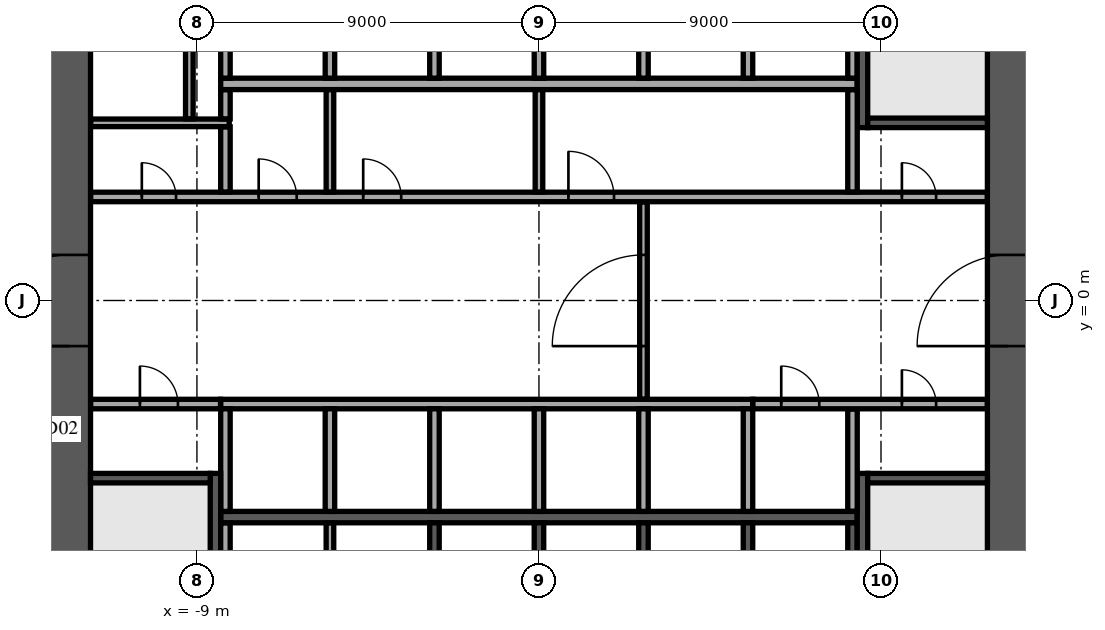
"""IFC4 building model, lengths in metres.
Left out: names, types, materials, properties, quantities, classifications, styles, units other than length and angle.
Written with IfcOpenShell. Run it as: python <this file> out.ifc"""

import sys

from ifc_helpers import new_model, si_unit, direction, frame, frame_2d, origin, place, context, subcontext, project, spatial, rectangle, extrude, element, fill, save


model = new_model("IFC4")
c1 = context("Model", 3, precision=1e-05, world=origin(), true_north=direction((0.0, 1.0)))
c2 = subcontext(c1, "Body", "Model", "MODEL_VIEW")
j1 = project(units=[si_unit("LENGTHUNIT", "METRE"), si_unit("PLANEANGLEUNIT", "RADIAN")], contexts=[c1])
p1 = place(None, origin())
s1 = spatial("IfcSite", under=j1, at=p1, CompositionType="ELEMENT")
p2 = place(p1, origin())
s2 = spatial("IfcBuilding", under=s1, at=p2, CompositionType="ELEMENT")
p3 = place(p2, frame((0.0, 0.0, 102.1)))
s3 = spatial("IfcBuildingStorey", under=s2, at=p3, CompositionType="ELEMENT", Elevation=102.1)
p4 = place(p3, frame((12.35, -11.8, 0.0), z_axis=(0.0, 0.0, 1.0), x_axis=(0.0, 1.0, 0.0)))
e1 = element("IfcWall", 1, at=p4, inside=s3, PredefinedType="SHEAR", context=c2, shape_type="SweptSolid", body=[
    extrude(rectangle(XDim=23.6, YDim=1.1, at=frame_2d((11.8, 0.0))), origin(), (0.0, 0.0, 1.0), 3.58),
])
p5 = place(p4, frame((10.6, 0.0, 0.0)))
e2 = element("IfcOpeningElement", 2, at=p5, cuts=e1, PredefinedType="OPENING", context=c2, shape_type="SweptSolid", body=[
    extrude(rectangle(XDim=2.4, YDim=2.4, at=frame_2d((1.2, 1.2))), frame((0.0, 0.56, 0.0), z_axis=(0.0, -1.0, 0.0), x_axis=(1.0, 0.0, 0.0)), (0.0, 0.0, 1.0), 1.12),
])
p6 = place(p3, frame((-12.35, -11.8, 0.0), z_axis=(0.0, 0.0, 1.0), x_axis=(0.0, 1.0, 0.0)))
e3 = element("IfcWall", 3, at=p6, inside=s3, PredefinedType="SHEAR", context=c2, shape_type="SweptSolid", body=[
    extrude(rectangle(XDim=23.6, YDim=1.1, at=frame_2d((11.8, 0.0))), origin(), (0.0, 0.0, 1.0), 3.58),
])
p7 = place(p6, frame((10.6, 0.0, 0.0)))
e4 = element("IfcOpeningElement", 4, at=p7, cuts=e3, PredefinedType="OPENING", context=c2, shape_type="SweptSolid", body=[
    extrude(rectangle(XDim=2.4, YDim=2.4, at=frame_2d((1.2, 1.2))), frame((0.0, 0.56, 0.0), z_axis=(0.0, -1.0, 0.0), x_axis=(1.0, 0.0, 0.0)), (0.0, 0.0, 1.0), 1.12),
])
for number, where, z_axis, x_axis in (
    (5, (-8.375, 5.7, 0.0), (0.0, 0.0, 1.0), (1.0, 0.0, 0.0)),
    (6, (-8.375, -5.7, 0.0), (0.0, 0.0, 1.0), (1.0, 0.0, 0.0)),
):
    element("IfcWall", number, at=place(p3, frame(where, z_axis=z_axis, x_axis=x_axis)), inside=s3, PredefinedType="SOLIDWALL", context=c2, shape_type="SweptSolid", body=[
        extrude(rectangle(XDim=16.75, YDim=0.3, at=frame_2d((8.375, 0.0))), origin(), (0.0, 0.0, 1.0), 3.58),
    ])
for number, where, z_axis, x_axis in (
    (7, (-8.25, 5.85, 0.0), (0.0, 0.0, 1.0), (0.0, 1.0, 0.0)),
    (8, (-5.5, 5.85, 0.0), (0.0, 0.0, 1.0), (0.0, 1.0, 0.0)),
    (9, (-2.75, 5.85, 0.0), (0.0, 0.0, 1.0), (0.0, 1.0, 0.0)),
    (10, (0.0, 5.85, 0.0), (0.0, 0.0, 1.0), (0.0, 1.0, 0.0)),
    (11, (2.75, 5.85, 0.0), (0.0, 0.0, 1.0), (0.0, 1.0, 0.0)),
    (12, (5.5, 5.85, 0.0), (0.0, 0.0, 1.0), (0.0, 1.0, 0.0)),
    (13, (8.25, 5.85, 0.0), (0.0, 0.0, 1.0), (0.0, 1.0, 0.0)),
):
    element("IfcWall", number, at=place(p3, frame(where, z_axis=z_axis, x_axis=x_axis)), inside=s3, PredefinedType="SOLIDWALL", context=c2, shape_type="SweptSolid", body=[
        extrude(rectangle(XDim=2.7, YDim=0.25, at=frame_2d((1.35, 0.0))), origin(), (0.0, 0.0, 1.0), 3.58),
    ])
p8 = place(p3, frame((-8.375, -2.725, 0.0), z_axis=(0.0, 0.0, 1.0), x_axis=(1.0, 0.0, 0.0)))
e14 = element("IfcWall", 14, at=p8, inside=s3, PredefinedType="SOLIDWALL", context=c2, shape_type="SweptSolid", body=[
    extrude(rectangle(XDim=14.0, YDim=0.25, at=frame_2d((7.0, 0.0))), origin(), (0.0, 0.0, 1.0), 3.58),
])
for number, where, z_axis, x_axis in (
    (15, (-8.25, -5.55, 0.0), (0.0, 0.0, 1.0), (0.0, 1.0, 0.0)),
    (16, (-5.5, -5.55, 0.0), (0.0, 0.0, 1.0), (0.0, 1.0, 0.0)),
    (17, (-2.75, -5.55, 0.0), (0.0, 0.0, 1.0), (0.0, 1.0, 0.0)),
    (18, (0.0, -5.55, 0.0), (0.0, 0.0, 1.0), (0.0, 1.0, 0.0)),
    (19, (2.75, -5.55, 0.0), (0.0, 0.0, 1.0), (0.0, 1.0, 0.0)),
    (20, (5.5, -5.55, 0.0), (0.0, 0.0, 1.0), (0.0, 1.0, 0.0)),
    (21, (-2.75, -8.55, 0.0), (0.0, 0.0, 1.0), (0.0, 1.0, 0.0)),
    (22, (0.0, -8.55, 0.0), (0.0, 0.0, 1.0), (0.0, 1.0, 0.0)),
    (23, (2.75, -8.55, 0.0), (0.0, 0.0, 1.0), (0.0, 1.0, 0.0)),
    (24, (5.5, -8.55, 0.0), (0.0, 0.0, 1.0), (0.0, 1.0, 0.0)),
    (25, (8.25, -8.55, 0.0), (0.0, 0.0, 1.0), (0.0, 1.0, 0.0)),
):
    element("IfcWall", number, at=place(p3, frame(where, z_axis=z_axis, x_axis=x_axis)), inside=s3, PredefinedType="SOLIDWALL", context=c2, shape_type="SweptSolid", body=[
        extrude(rectangle(XDim=2.7, YDim=0.25, at=frame_2d((1.35, 0.0))), origin(), (0.0, 0.0, 1.0), 3.58),
    ])
p9 = place(p3, frame((8.512, 4.55, 0.0), z_axis=(0.0, 0.0, 1.0), x_axis=(0.0, 1.0, 0.0)))
e26 = element("IfcWall", 26, at=p9, inside=s3, PredefinedType="SOLIDWALL", context=c2, shape_type="SweptSolid", body=[
    extrude(rectangle(XDim=7.25, YDim=0.275, at=frame_2d((3.625, 0.0))), origin(), (0.0, 0.0, 1.0), 3.58),
])
p10 = place(p9, frame((6.0, 0.0, 0.0)))
e27 = element("IfcOpeningElement", 27, at=p10, cuts=e26, PredefinedType="OPENING", context=c2, shape_type="SweptSolid", body=[
    extrude(rectangle(XDim=1.0, YDim=2.1, at=frame_2d((0.5, 1.05))), frame((0.0, 0.147, 0.0), z_axis=(0.0, -1.0, 0.0), x_axis=(1.0, 0.0, 0.0)), (0.0, 0.0, 1.0), 0.295),
])
p11 = place(p3, frame((8.65, 4.675, 0.0), z_axis=(0.0, 0.0, 1.0), x_axis=(1.0, 0.0, 0.0)))
e28 = element("IfcWall", 28, at=p11, inside=s3, PredefinedType="SOLIDWALL", context=c2, shape_type="SweptSolid", body=[
    extrude(rectangle(XDim=3.15, YDim=0.25, at=frame_2d((1.575, 0.0))), origin(), (0.0, 0.0, 1.0), 3.58),
])
p12 = place(p3, frame((-8.512, -4.55, 0.0), z_axis=(0.0, 0.0, 1.0), x_axis=(0.0, -1.0, 0.0)))
e29 = element("IfcWall", 29, at=p12, inside=s3, PredefinedType="SOLIDWALL", context=c2, shape_type="SweptSolid", body=[
    extrude(rectangle(XDim=7.25, YDim=0.275, at=frame_2d((3.625, 0.0))), origin(), (0.0, 0.0, 1.0), 3.58),
])
p13 = place(p12, frame((6.0, 0.0, 0.0)))
e30 = element("IfcOpeningElement", 30, at=p13, cuts=e29, PredefinedType="OPENING", context=c2, shape_type="SweptSolid", body=[
    extrude(rectangle(XDim=1.0, YDim=2.1, at=frame_2d((0.5, 1.05))), frame((0.0, 0.147, 0.0), z_axis=(0.0, -1.0, 0.0), x_axis=(1.0, 0.0, 0.0)), (0.0, 0.0, 1.0), 0.295),
])
p14 = place(p3, frame((-8.65, -4.675, 0.0), z_axis=(0.0, 0.0, 1.0), x_axis=(-1.0, 0.0, 0.0)))
e31 = element("IfcWall", 31, at=p14, inside=s3, PredefinedType="SOLIDWALL", context=c2, shape_type="SweptSolid", body=[
    extrude(rectangle(XDim=3.15, YDim=0.25, at=frame_2d((1.575, 0.0))), origin(), (0.0, 0.0, 1.0), 3.58),
])
p15 = place(p3, frame((8.512, -4.55, 0.0), z_axis=(0.0, 0.0, 1.0), x_axis=(0.0, -1.0, 0.0)))
e32 = element("IfcWall", 32, at=p15, inside=s3, PredefinedType="SOLIDWALL", context=c2, shape_type="SweptSolid", body=[
    extrude(rectangle(XDim=7.25, YDim=0.275, at=frame_2d((3.625, 0.0))), origin(), (0.0, 0.0, 1.0), 3.58),
])
p16 = place(p15, frame((6.0, 0.0, 0.0)))
e33 = element("IfcOpeningElement", 33, at=p16, cuts=e32, PredefinedType="OPENING", context=c2, shape_type="SweptSolid", body=[
    extrude(rectangle(XDim=1.0, YDim=2.1, at=frame_2d((0.5, 1.05))), frame((0.0, 0.147, 0.0), z_axis=(0.0, -1.0, 0.0), x_axis=(1.0, 0.0, 0.0)), (0.0, 0.0, 1.0), 0.295),
])
p17 = place(p3, frame((8.65, -4.675, 0.0), z_axis=(0.0, 0.0, 1.0), x_axis=(1.0, 0.0, 0.0)))
e34 = element("IfcWall", 34, at=p17, inside=s3, PredefinedType="SOLIDWALL", context=c2, shape_type="SweptSolid", body=[
    extrude(rectangle(XDim=3.15, YDim=0.25, at=frame_2d((1.575, 0.0))), origin(), (0.0, 0.0, 1.0), 3.58),
])
p18 = place(p3, frame((-8.25, -8.545, 0.0), z_axis=(0.0, 0.0, 1.0), x_axis=(0.0, 1.0, 0.0)))
e35 = element("IfcWall", 35, at=p18, inside=s3, PredefinedType="PARTITIONING", context=c2, shape_type="SweptSolid", body=[
    extrude(rectangle(XDim=2.69, YDim=0.25, at=frame_2d((1.345, 0.0))), origin(), (0.0, 0.0, 1.0), 3.58),
])
p19 = place(p3, frame((-5.5, -8.545, 0.0), z_axis=(0.0, 0.0, 1.0), x_axis=(0.0, 1.0, 0.0)))
e36 = element("IfcWall", 36, at=p19, inside=s3, PredefinedType="PARTITIONING", context=c2, shape_type="SweptSolid", body=[
    extrude(rectangle(XDim=2.69, YDim=0.2, at=frame_2d((1.345, 0.0))), origin(), (0.0, 0.0, 1.0), 3.58),
])
p20 = place(p3, frame((8.25, -5.545, 0.0), z_axis=(0.0, 0.0, 1.0), x_axis=(0.0, 1.0, 0.0)))
e37 = element("IfcWall", 37, at=p20, inside=s3, PredefinedType="PARTITIONING", context=c2, shape_type="SweptSolid", body=[
    extrude(rectangle(XDim=2.69, YDim=0.25, at=frame_2d((1.345, 0.0))), origin(), (0.0, 0.0, 1.0), 3.58),
])
p21 = place(p3, frame((-11.795, -2.725, 0.0), z_axis=(0.0, 0.0, 1.0), x_axis=(1.0, 0.0, 0.0)))
e38 = element("IfcWall", 38, at=p21, inside=s3, PredefinedType="PARTITIONING", context=c2, shape_type="SweptSolid", body=[
    extrude(rectangle(XDim=3.415, YDim=0.25, at=frame_2d((1.708, 0.0))), origin(), (0.0, 0.0, 1.0), 3.58),
])
p22 = place(p21, frame((1.295, 0.0, 0.0)))
e39 = element("IfcOpeningElement", 39, at=p22, cuts=e38, PredefinedType="OPENING", context=c2, shape_type="SweptSolid", body=[
    extrude(rectangle(XDim=1.0, YDim=2.1, at=frame_2d((0.5, 1.05))), frame((0.0, 0.135, 0.0), z_axis=(0.0, -1.0, 0.0), x_axis=(1.0, 0.0, 0.0)), (0.0, 0.0, 1.0), 0.27),
])
p23 = place(p3, frame((5.63, -2.725, 0.0), z_axis=(0.0, 0.0, 1.0), x_axis=(1.0, 0.0, 0.0)))
e40 = element("IfcWall", 40, at=p23, inside=s3, PredefinedType="PARTITIONING", context=c2, shape_type="SweptSolid", body=[
    extrude(rectangle(XDim=6.165, YDim=0.25, at=frame_2d((3.083, 0.0))), origin(), (0.0, 0.0, 1.0), 3.58),
])
p24 = place(p23, frame((0.745, 0.0, 0.0)))
e41 = element("IfcOpeningElement", 41, at=p24, cuts=e40, PredefinedType="OPENING", context=c2, shape_type="SweptSolid", body=[
    extrude(rectangle(XDim=1.0, YDim=2.1, at=frame_2d((0.5, 1.05))), frame((0.0, 0.135, 0.0), z_axis=(0.0, -1.0, 0.0), x_axis=(1.0, 0.0, 0.0)), (0.0, 0.0, 1.0), 0.27),
])
p25 = place(p23, frame((3.92, 0.0, 0.0)))
e42 = element("IfcOpeningElement", 42, at=p25, cuts=e40, PredefinedType="OPENING", context=c2, shape_type="SweptSolid", body=[
    extrude(rectangle(XDim=0.9, YDim=2.1, at=frame_2d((0.45, 1.05))), frame((0.0, 0.135, 0.0), z_axis=(0.0, -1.0, 0.0), x_axis=(1.0, 0.0, 0.0)), (0.0, 0.0, 1.0), 0.27),
])
p26 = place(p3, frame((2.75, -2.595, 0.0), z_axis=(0.0, 0.0, 1.0), x_axis=(0.0, 1.0, 0.0)))
e43 = element("IfcWall", 43, at=p26, inside=s3, PredefinedType="PARTITIONING", context=c2, shape_type="SweptSolid", body=[
    extrude(rectangle(XDim=5.19, YDim=0.2, at=frame_2d((2.595, 0.0))), origin(), (0.0, 0.0, 1.0), 3.58),
])
p27 = place(p26, frame((1.395, 0.0, 0.0)))
e44 = element("IfcOpeningElement", 44, at=p27, cuts=e43, PredefinedType="OPENING", context=c2, shape_type="SweptSolid", body=[
    extrude(rectangle(XDim=2.4, YDim=2.4, at=frame_2d((1.2, 1.2))), frame((0.0, 0.11, 0.0), z_axis=(0.0, -1.0, 0.0), x_axis=(1.0, 0.0, 0.0)), (0.0, 0.0, 1.0), 0.22),
])
p28 = place(p3, frame((-11.795, 2.725, 0.0), z_axis=(0.0, 0.0, 1.0), x_axis=(1.0, 0.0, 0.0)))
e45 = element("IfcWall", 45, at=p28, inside=s3, PredefinedType="PARTITIONING", context=c2, shape_type="SweptSolid", body=[
    extrude(rectangle(XDim=23.59, YDim=0.25, at=frame_2d((11.795, 0.0))), origin(), (0.0, 0.0, 1.0), 3.58),
])
p29 = place(p28, frame((21.345, 0.0, 0.0)))
e46 = element("IfcOpeningElement", 46, at=p29, cuts=e45, PredefinedType="OPENING", context=c2, shape_type="SweptSolid", body=[
    extrude(rectangle(XDim=0.9, YDim=2.1, at=frame_2d((0.45, 1.05))), frame((0.0, 0.135, 0.0), z_axis=(0.0, -1.0, 0.0), x_axis=(1.0, 0.0, 0.0)), (0.0, 0.0, 1.0), 0.27),
])
p30 = place(p28, frame((1.345, 0.0, 0.0)))
e47 = element("IfcOpeningElement", 47, at=p30, cuts=e45, PredefinedType="OPENING", context=c2, shape_type="SweptSolid", body=[
    extrude(rectangle(XDim=0.9, YDim=2.1, at=frame_2d((0.45, 1.05))), frame((0.0, 0.135, 0.0), z_axis=(0.0, -1.0, 0.0), x_axis=(1.0, 0.0, 0.0)), (0.0, 0.0, 1.0), 0.27),
])
p31 = place(p28, frame((4.42, 0.0, 0.0)))
e48 = element("IfcOpeningElement", 48, at=p31, cuts=e45, PredefinedType="OPENING", context=c2, shape_type="SweptSolid", body=[
    extrude(rectangle(XDim=1.0, YDim=2.1, at=frame_2d((0.5, 1.05))), frame((0.0, 0.135, 0.0), z_axis=(0.0, -1.0, 0.0), x_axis=(1.0, 0.0, 0.0)), (0.0, 0.0, 1.0), 0.27),
])
p32 = place(p28, frame((7.17, 0.0, 0.0)))
e49 = element("IfcOpeningElement", 49, at=p32, cuts=e45, PredefinedType="OPENING", context=c2, shape_type="SweptSolid", body=[
    extrude(rectangle(XDim=1.0, YDim=2.1, at=frame_2d((0.5, 1.05))), frame((0.0, 0.135, 0.0), z_axis=(0.0, -1.0, 0.0), x_axis=(1.0, 0.0, 0.0)), (0.0, 0.0, 1.0), 0.27),
])
p33 = place(p28, frame((12.57, 0.0, 0.0)))
e50 = element("IfcOpeningElement", 50, at=p33, cuts=e45, PredefinedType="OPENING", context=c2, shape_type="SweptSolid", body=[
    extrude(rectangle(XDim=1.2, YDim=2.1, at=frame_2d((0.6, 1.05))), frame((0.0, 0.135, 0.0), z_axis=(0.0, -1.0, 0.0), x_axis=(1.0, 0.0, 0.0)), (0.0, 0.0, 1.0), 0.27),
])
p34 = place(p3, frame((-8.25, 2.855, 0.0), z_axis=(0.0, 0.0, 1.0), x_axis=(0.0, 1.0, 0.0)))
e51 = element("IfcWall", 51, at=p34, inside=s3, PredefinedType="PARTITIONING", context=c2, shape_type="SweptSolid", body=[
    extrude(rectangle(XDim=1.715, YDim=0.25, at=frame_2d((0.857, 0.0))), origin(), (0.0, 0.0, 1.0), 3.58),
])
for number, where, z_axis, x_axis in (
    (52, (-5.5, 2.855, 0.0), (0.0, 0.0, 1.0), (0.0, 1.0, 0.0)),
    (53, (0.0, 2.855, 0.0), (0.0, 0.0, 1.0), (0.0, 1.0, 0.0)),
):
    element("IfcWall", number, at=place(p3, frame(where, z_axis=z_axis, x_axis=x_axis)), inside=s3, PredefinedType="PARTITIONING", context=c2, shape_type="SweptSolid", body=[
        extrude(rectangle(XDim=2.69, YDim=0.2, at=frame_2d((1.345, 0.0))), origin(), (0.0, 0.0, 1.0), 3.58),
    ])
p35 = place(p3, frame((8.25, 2.855, 0.0), z_axis=(0.0, 0.0, 1.0), x_axis=(0.0, 1.0, 0.0)))
e54 = element("IfcWall", 54, at=p35, inside=s3, PredefinedType="PARTITIONING", context=c2, shape_type="SweptSolid", body=[
    extrude(rectangle(XDim=2.69, YDim=0.25, at=frame_2d((1.345, 0.0))), origin(), (0.0, 0.0, 1.0), 3.58),
])
p36 = place(p3, frame((-11.795, 4.675, 0.0), z_axis=(0.0, 0.0, 1.0), x_axis=(1.0, 0.0, 0.0)))
e55 = element("IfcWall", 55, at=p36, inside=s3, PredefinedType="PARTITIONING", context=c2, shape_type="SweptSolid", body=[
    extrude(rectangle(XDim=3.645, YDim=0.2, at=frame_2d((1.823, 0.0))), origin(), (0.0, 0.0, 1.0), 3.58),
])
p37 = place(p3, frame((-9.2, 4.78, 0.0), z_axis=(0.0, 0.0, 1.0), x_axis=(0.0, 1.0, 0.0)))
e56 = element("IfcWall", 56, at=p37, inside=s3, PredefinedType="PARTITIONING", context=c2, shape_type="SweptSolid", body=[
    extrude(rectangle(XDim=7.015, YDim=0.2, at=frame_2d((3.507, 0.0))), origin(), (0.0, 0.0, 1.0), 3.58),
])
p38 = place(p37, frame((2.92, 0.0, 0.0)))
e57 = element("IfcOpeningElement", 57, at=p38, cuts=e56, PredefinedType="OPENING", context=c2, shape_type="SweptSolid", body=[
    extrude(rectangle(XDim=1.0, YDim=2.1, at=frame_2d((0.5, 1.05))), frame((0.0, 0.11, 0.0), z_axis=(0.0, -1.0, 0.0), x_axis=(1.0, 0.0, 0.0)), (0.0, 0.0, 1.0), 0.22),
])
p39 = place(p3, frame((-8.25, 4.78, 0.0), z_axis=(0.0, 0.0, 1.0), x_axis=(0.0, 1.0, 0.0)))
e58 = element("IfcWall", 58, at=p39, inside=s3, PredefinedType="PARTITIONING", context=c2, shape_type="SweptSolid", body=[
    extrude(rectangle(XDim=0.765, YDim=0.25, at=frame_2d((0.382, 0.0))), origin(), (0.0, 0.0, 1.0), 3.58),
])
p40 = place(p5, origin())
e59 = element("IfcDoor", 59, at=p40, inside=s3, OperationType="SINGLE_SWING_LEFT", PredefinedType="DOOR", context=c2, shape_type="SweptSolid", body=[
    extrude(rectangle(XDim=2.4, YDim=2.4, at=frame_2d((1.2, 1.2))), frame((0.0, 0.025, 0.0), z_axis=(0.0, -1.0, 0.0), x_axis=(1.0, 0.0, 0.0)), (0.0, 0.0, 1.0), 0.05),
])
fill(e2, e59)
p41 = place(p7, origin())
e60 = element("IfcDoor", 60, at=p41, inside=s3, OperationType="SINGLE_SWING_LEFT", PredefinedType="DOOR", context=c2, shape_type="SweptSolid", body=[
    extrude(rectangle(XDim=2.4, YDim=2.4, at=frame_2d((1.2, 1.2))), frame((0.0, 0.025, 0.0), z_axis=(0.0, -1.0, 0.0), x_axis=(1.0, 0.0, 0.0)), (0.0, 0.0, 1.0), 0.05),
])
fill(e4, e60)
p42 = place(p22, origin())
e61 = element("IfcDoor", 61, at=p42, inside=s3, OperationType="SINGLE_SWING_RIGHT", PredefinedType="DOOR", context=c2, shape_type="SweptSolid", body=[
    extrude(rectangle(XDim=1.0, YDim=2.1, at=frame_2d((0.5, 1.05))), frame((0.0, 0.025, 0.0), z_axis=(0.0, -1.0, 0.0), x_axis=(1.0, 0.0, 0.0)), (0.0, 0.0, 1.0), 0.05),
])
fill(e39, e61)
p43 = place(p24, origin())
e62 = element("IfcDoor", 62, at=p43, inside=s3, OperationType="SINGLE_SWING_RIGHT", PredefinedType="DOOR", context=c2, shape_type="SweptSolid", body=[
    extrude(rectangle(XDim=1.0, YDim=2.1, at=frame_2d((0.5, 1.05))), frame((0.0, 0.025, 0.0), z_axis=(0.0, -1.0, 0.0), x_axis=(1.0, 0.0, 0.0)), (0.0, 0.0, 1.0), 0.05),
])
fill(e41, e62)
p44 = place(p29, origin())
e63 = element("IfcDoor", 63, at=p44, inside=s3, OperationType="SINGLE_SWING_RIGHT", PredefinedType="DOOR", context=c2, shape_type="SweptSolid", body=[
    extrude(rectangle(XDim=0.9, YDim=2.1, at=frame_2d((0.45, 1.05))), frame((0.0, 0.025, 0.0), z_axis=(0.0, -1.0, 0.0), x_axis=(1.0, 0.0, 0.0)), (0.0, 0.0, 1.0), 0.05),
])
fill(e46, e63)
p45 = place(p25, origin())
e64 = element("IfcDoor", 64, at=p45, inside=s3, OperationType="SINGLE_SWING_RIGHT", PredefinedType="DOOR", context=c2, shape_type="SweptSolid", body=[
    extrude(rectangle(XDim=0.9, YDim=2.1, at=frame_2d((0.45, 1.05))), frame((0.0, 0.025, 0.0), z_axis=(0.0, -1.0, 0.0), x_axis=(1.0, 0.0, 0.0)), (0.0, 0.0, 1.0), 0.05),
])
fill(e42, e64)
p46 = place(p30, origin())
e65 = element("IfcDoor", 65, at=p46, inside=s3, OperationType="SINGLE_SWING_RIGHT", PredefinedType="DOOR", context=c2, shape_type="SweptSolid", body=[
    extrude(rectangle(XDim=0.9, YDim=2.1, at=frame_2d((0.45, 1.05))), frame((0.0, 0.025, 0.0), z_axis=(0.0, -1.0, 0.0), x_axis=(1.0, 0.0, 0.0)), (0.0, 0.0, 1.0), 0.05),
])
fill(e47, e65)
p47 = place(p31, origin())
e66 = element("IfcDoor", 66, at=p47, inside=s3, OperationType="SINGLE_SWING_RIGHT", PredefinedType="DOOR", context=c2, shape_type="SweptSolid", body=[
    extrude(rectangle(XDim=1.0, YDim=2.1, at=frame_2d((0.5, 1.05))), frame((0.0, 0.025, 0.0), z_axis=(0.0, -1.0, 0.0), x_axis=(1.0, 0.0, 0.0)), (0.0, 0.0, 1.0), 0.05),
])
fill(e48, e66)
p48 = place(p32, origin())
e67 = element("IfcDoor", 67, at=p48, inside=s3, OperationType="SINGLE_SWING_RIGHT", PredefinedType="DOOR", context=c2, shape_type="SweptSolid", body=[
    extrude(rectangle(XDim=1.0, YDim=2.1, at=frame_2d((0.5, 1.05))), frame((0.0, 0.025, 0.0), z_axis=(0.0, -1.0, 0.0), x_axis=(1.0, 0.0, 0.0)), (0.0, 0.0, 1.0), 0.05),
])
fill(e49, e67)
p49 = place(p33, origin())
e68 = element("IfcDoor", 68, at=p49, inside=s3, OperationType="SINGLE_SWING_LEFT", PredefinedType="DOOR", context=c2, shape_type="SweptSolid", body=[
    extrude(rectangle(XDim=1.2, YDim=2.1, at=frame_2d((0.6, 1.05))), frame((0.0, 0.025, 0.0), z_axis=(0.0, -1.0, 0.0), x_axis=(1.0, 0.0, 0.0)), (0.0, 0.0, 1.0), 0.05),
])
fill(e50, e68)
p50 = place(p27, origin())
e69 = element("IfcDoor", 69, at=p50, inside=s3, OperationType="DOUBLE_DOOR_DOUBLE_SWING", PredefinedType="DOOR", context=c2, shape_type="SweptSolid", body=[
    extrude(rectangle(XDim=2.4, YDim=2.4, at=frame_2d((1.2, 1.2))), frame((0.0, 0.025, 0.0), z_axis=(0.0, -1.0, 0.0), x_axis=(1.0, 0.0, 0.0)), (0.0, 0.0, 1.0), 0.05),
])
fill(e44, e69)
save(model, sys.argv[1])
